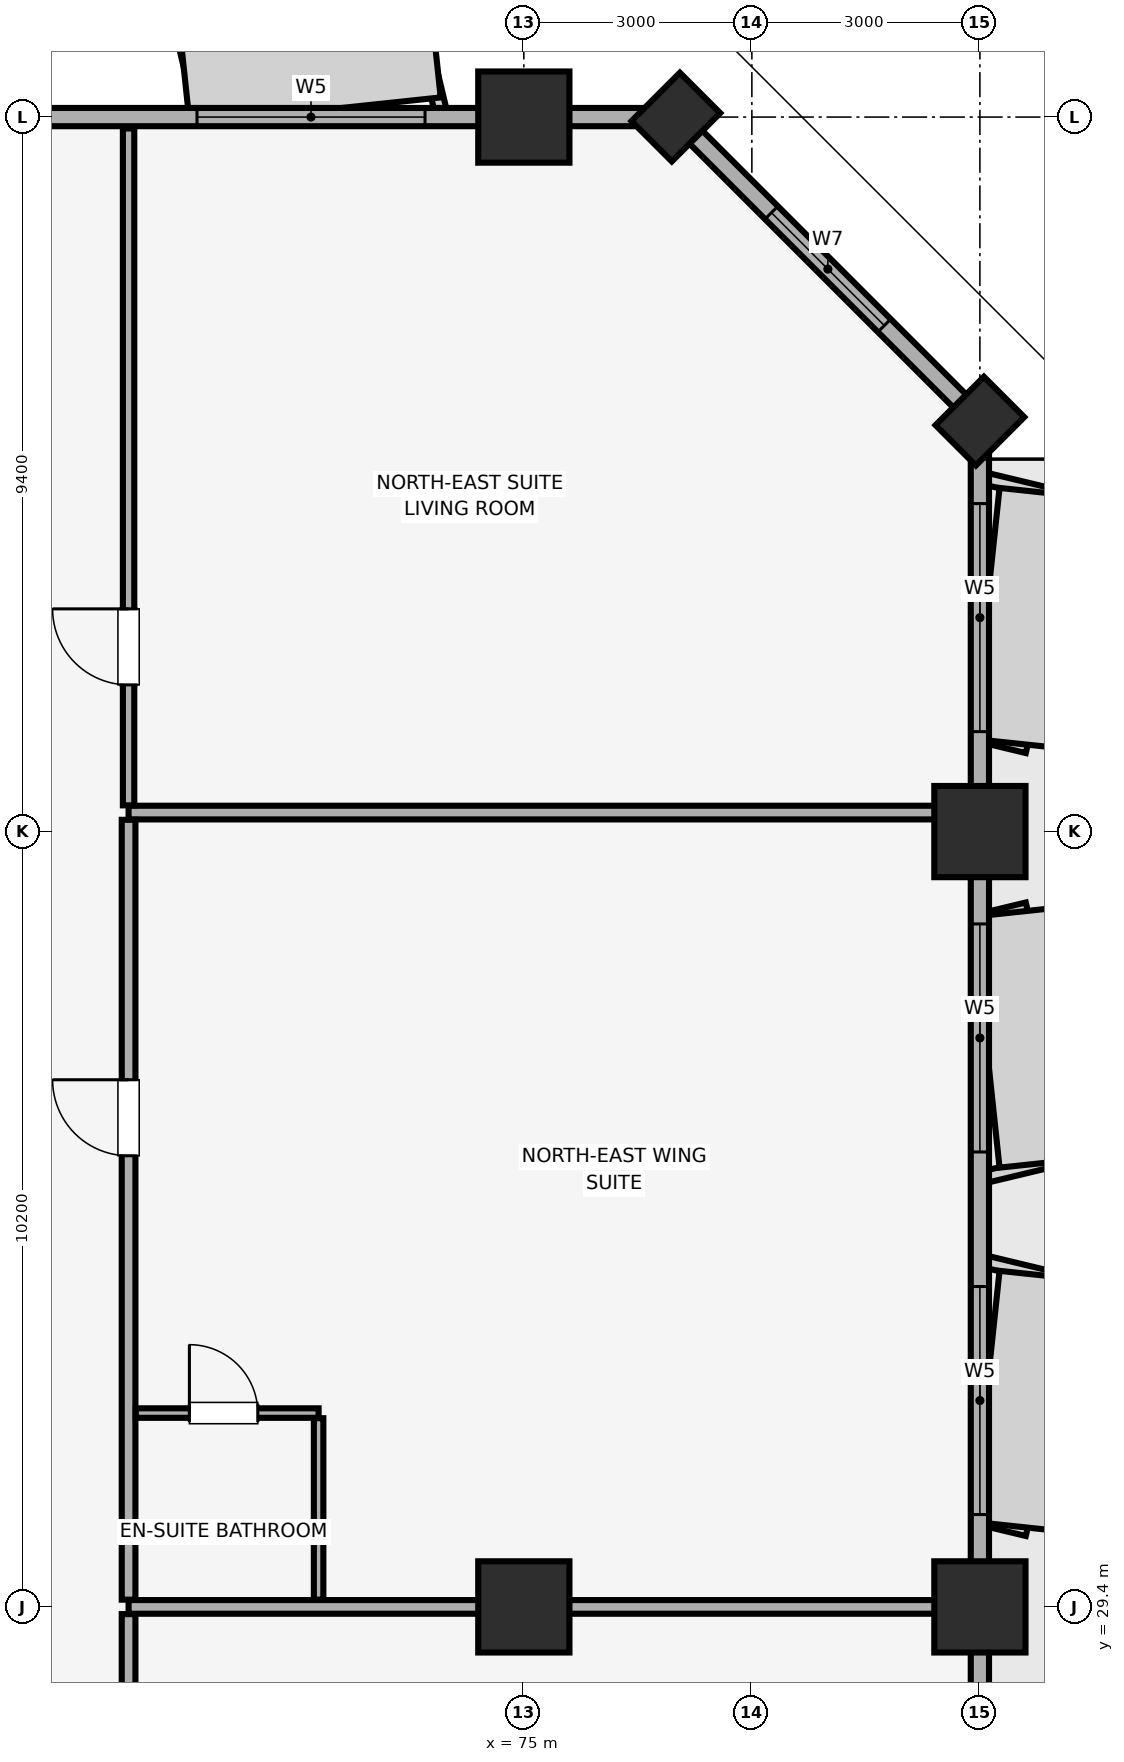
"""IFC4 building model, lengths in metres.
Left out: names, types, materials, properties, quantities, classifications, styles, units other than length and angle.
Written with IfcOpenShell. Run it as: python <this file> out.ifc"""

import sys

from ifc_helpers import new_model, si_unit, direction, frame, frame_2d, origin, origin_2d, place, context, subcontext, project, spatial, rectangle, extrude, element, fill, save


model = new_model("IFC4")
c1 = context("Model", 3, precision=1e-05, world=origin(), true_north=direction((0.0, 1.0)))
c2 = subcontext(c1, "Body", "Model", "MODEL_VIEW")
j1 = project(units=[si_unit("LENGTHUNIT", "METRE"), si_unit("PLANEANGLEUNIT", "RADIAN")], contexts=[c1])
p1 = place(None, origin())
s1 = spatial("IfcSite", under=j1, at=p1, CompositionType="ELEMENT")
p2 = place(p1, origin())
s2 = spatial("IfcBuilding", under=s1, at=p2, CompositionType="ELEMENT")
p3 = place(p2, frame((0.0, 0.0, 135.35)))
s3 = spatial("IfcBuildingStorey", under=s2, at=p3, CompositionType="ELEMENT", Elevation=135.35)
for number, where, z_axis, x_axis in (
    (1, (81.0, 29.4, 0.0), (0.0, 0.0, 1.0), (1.0, 0.0, 0.0)),
    (2, (81.0, 39.6, 0.0), (0.0, 0.0, 1.0), (1.0, 0.0, 0.0)),
):
    element("IfcColumn", number, at=place(p3, frame(where, z_axis=z_axis, x_axis=x_axis)), inside=s3, PredefinedType="COLUMN", context=c2, shape_type="SweptSolid", body=[
        extrude(rectangle(XDim=1.2, YDim=1.2, at=origin_2d()), origin(), (0.0, 0.0, 1.0), 3.56),
    ])
for number, where, z_axis, x_axis in (
    (3, (81.0, 45.0, 0.0), (0.0, 0.0, 1.0), (0.707, 0.707, 0.0)),
    (4, (77.0, 49.0, 0.0), (0.0, 0.0, 1.0), (0.707, 0.707, 0.0)),
):
    element("IfcColumn", number, at=place(p3, frame(where, z_axis=z_axis, x_axis=x_axis)), inside=s3, PredefinedType="PILASTER", context=c2, shape_type="SweptSolid", body=[
        extrude(rectangle(XDim=0.9, YDim=0.75, at=origin_2d()), origin(), (0.0, 0.0, 1.0), 3.56),
    ])
for number, where, z_axis, x_axis in (
    (5, (75.0, 29.4, 0.0), (0.0, 0.0, 1.0), (1.0, 0.0, 0.0)),
    (6, (75.0, 49.0, 0.0), (0.0, 0.0, 1.0), (1.0, 0.0, 0.0)),
):
    element("IfcColumn", number, at=place(p3, frame(where, z_axis=z_axis, x_axis=x_axis)), inside=s3, PredefinedType="COLUMN", context=c2, shape_type="SweptSolid", body=[
        extrude(rectangle(XDim=1.2, YDim=1.2, at=origin_2d()), origin(), (0.0, 0.0, 1.0), 3.56),
    ])
p4 = place(p3, frame((81.0, 7.0, 0.0), z_axis=(0.0, 0.0, 1.0), x_axis=(0.0, 1.0, 0.0)))
e7 = element("IfcWall", 7, at=p4, inside=s3, PredefinedType="SOLIDWALL", context=c2, shape_type="SweptSolid", body=[
    extrude(rectangle(XDim=38.0, YDim=0.24, at=frame_2d((19.0, 0.0))), origin(), (0.0, 0.0, 1.0), 2.61),
])
p5 = place(p4, frame((14.5, 0.0, 0.0)))
e8 = element("IfcOpeningElement", 8, at=p5, cuts=e7, PredefinedType="OPENING", context=c2, shape_type="SweptSolid", body=[
    extrude(rectangle(XDim=1.4, YDim=2.2, at=frame_2d((0.7, 1.1))), frame((0.0, 0.13, 0.0), z_axis=(0.0, -1.0, 0.0), x_axis=(1.0, 0.0, 0.0)), (0.0, 0.0, 1.0), 0.26),
])
p6 = place(p4, frame((1.05, 0.0, 0.85)))
e9 = element("IfcOpeningElement", 9, at=p6, cuts=e7, PredefinedType="OPENING", context=c2, shape_type="SweptSolid", body=[
    extrude(rectangle(XDim=3.0, YDim=1.5, at=frame_2d((1.5, 0.75))), frame((0.0, 0.13, 0.0), z_axis=(0.0, -1.0, 0.0), x_axis=(1.0, 0.0, 0.0)), (0.0, 0.0, 1.0), 0.26),
])
p7 = place(p4, frame((5.4, 0.0, 0.85)))
e10 = element("IfcOpeningElement", 10, at=p7, cuts=e7, PredefinedType="OPENING", context=c2, shape_type="SweptSolid", body=[
    extrude(rectangle(XDim=1.5, YDim=1.4, at=frame_2d((0.75, 0.7))), frame((0.0, 0.13, 0.0), z_axis=(0.0, -1.0, 0.0), x_axis=(1.0, 0.0, 0.0)), (0.0, 0.0, 1.0), 0.26),
])
p8 = place(p4, frame((9.84, 0.0, 0.85)))
e11 = element("IfcOpeningElement", 11, at=p8, cuts=e7, PredefinedType="OPENING", context=c2, shape_type="SweptSolid", body=[
    extrude(rectangle(XDim=3.0, YDim=1.5, at=frame_2d((1.5, 0.75))), frame((0.0, 0.13, 0.0), z_axis=(0.0, -1.0, 0.0), x_axis=(1.0, 0.0, 0.0)), (0.0, 0.0, 1.0), 0.26),
])
p9 = place(p4, frame((17.56, 0.0, 0.85)))
e12 = element("IfcOpeningElement", 12, at=p9, cuts=e7, PredefinedType="OPENING", context=c2, shape_type="SweptSolid", body=[
    extrude(rectangle(XDim=3.0, YDim=1.5, at=frame_2d((1.5, 0.75))), frame((0.0, 0.13, 0.0), z_axis=(0.0, -1.0, 0.0), x_axis=(1.0, 0.0, 0.0)), (0.0, 0.0, 1.0), 0.26),
])
p10 = place(p4, frame((23.615, 0.0, 0.85)))
e13 = element("IfcOpeningElement", 13, at=p10, cuts=e7, PredefinedType="OPENING", context=c2, shape_type="SweptSolid", body=[
    extrude(rectangle(XDim=3.0, YDim=1.5, at=frame_2d((1.5, 0.75))), frame((0.0, 0.13, 0.0), z_axis=(0.0, -1.0, 0.0), x_axis=(1.0, 0.0, 0.0)), (0.0, 0.0, 1.0), 0.26),
])
p11 = place(p4, frame((28.385, 0.0, 0.85)))
e14 = element("IfcOpeningElement", 14, at=p11, cuts=e7, PredefinedType="OPENING", context=c2, shape_type="SweptSolid", body=[
    extrude(rectangle(XDim=3.0, YDim=1.5, at=frame_2d((1.5, 0.75))), frame((0.0, 0.13, 0.0), z_axis=(0.0, -1.0, 0.0), x_axis=(1.0, 0.0, 0.0)), (0.0, 0.0, 1.0), 0.26),
])
p12 = place(p4, frame((33.915, 0.0, 0.85)))
e15 = element("IfcOpeningElement", 15, at=p12, cuts=e7, PredefinedType="OPENING", context=c2, shape_type="SweptSolid", body=[
    extrude(rectangle(XDim=3.0, YDim=1.5, at=frame_2d((1.5, 0.75))), frame((0.0, 0.13, 0.0), z_axis=(0.0, -1.0, 0.0), x_axis=(1.0, 0.0, 0.0)), (0.0, 0.0, 1.0), 0.26),
])
p13 = place(p3, frame((81.0, 45.0, 0.0), z_axis=(0.0, 0.0, 1.0), x_axis=(-0.707106781187, 0.707106781187, 0.0)))
e16 = element("IfcWall", 16, at=p13, inside=s3, PredefinedType="SOLIDWALL", context=c2, shape_type="SweptSolid", body=[
    extrude(rectangle(XDim=5.657, YDim=0.24, at=frame_2d((2.828, 0.0))), origin(), (0.0, 0.0, 1.0), 2.61),
])
p14 = place(p13, frame((1.778, 0.0, 0.85)))
e17 = element("IfcOpeningElement", 17, at=p14, cuts=e16, PredefinedType="OPENING", context=c2, shape_type="SweptSolid", body=[
    extrude(rectangle(XDim=2.1, YDim=1.6, at=frame_2d((1.05, 0.8))), frame((0.0, 0.13, 0.0), z_axis=(0.0, -1.0, 0.0), x_axis=(1.0, 0.0, 0.0)), (0.0, 0.0, 1.0), 0.26),
])
p15 = place(p3, frame((77.0, 49.0, 0.0), z_axis=(0.0, 0.0, 1.0), x_axis=(-1.0, 0.0, 0.0)))
e18 = element("IfcWall", 18, at=p15, inside=s3, PredefinedType="SOLIDWALL", context=c2, shape_type="SweptSolid", body=[
    extrude(rectangle(XDim=70.0, YDim=0.24, at=frame_2d((35.0, 0.0))), origin(), (0.0, 0.0, 1.0), 2.61),
])
p16 = place(p15, frame((63.7, 0.0, 0.85)))
e19 = element("IfcOpeningElement", 19, at=p16, cuts=e18, PredefinedType="OPENING", context=c2, shape_type="SweptSolid", body=[
    extrude(rectangle(XDim=3.0, YDim=1.5, at=frame_2d((1.5, 0.75))), frame((0.0, 0.13, 0.0), z_axis=(0.0, -1.0, 0.0), x_axis=(1.0, 0.0, 0.0)), (0.0, 0.0, 1.0), 0.26),
])
p17 = place(p15, frame((3.3, 0.0, 0.85)))
e20 = element("IfcOpeningElement", 20, at=p17, cuts=e18, PredefinedType="OPENING", context=c2, shape_type="SweptSolid", body=[
    extrude(rectangle(XDim=3.0, YDim=1.5, at=frame_2d((1.5, 0.75))), frame((0.0, 0.13, 0.0), z_axis=(0.0, -1.0, 0.0), x_axis=(1.0, 0.0, 0.0)), (0.0, 0.0, 1.0), 0.26),
])
p18 = place(p15, frame((48.565, 0.0, 0.9)))
e21 = element("IfcOpeningElement", 21, at=p18, cuts=e18, PredefinedType="OPENING", context=c2, shape_type="SweptSolid", body=[
    extrude(rectangle(XDim=1.5, YDim=1.4, at=frame_2d((0.75, 0.7))), frame((0.0, 0.13, 0.0), z_axis=(0.0, -1.0, 0.0), x_axis=(1.0, 0.0, 0.0)), (0.0, 0.0, 1.0), 0.26),
])
p19 = place(p15, frame((41.75, 0.0, 0.9)))
e22 = element("IfcOpeningElement", 22, at=p19, cuts=e18, PredefinedType="OPENING", context=c2, shape_type="SweptSolid", body=[
    extrude(rectangle(XDim=1.5, YDim=1.4, at=frame_2d((0.75, 0.7))), frame((0.0, 0.13, 0.0), z_axis=(0.0, -1.0, 0.0), x_axis=(1.0, 0.0, 0.0)), (0.0, 0.0, 1.0), 0.26),
])
p20 = place(p15, frame((25.3, 0.0, 0.9)))
e23 = element("IfcOpeningElement", 23, at=p20, cuts=e18, PredefinedType="OPENING", context=c2, shape_type="SweptSolid", body=[
    extrude(rectangle(XDim=1.5, YDim=1.4, at=frame_2d((0.75, 0.7))), frame((0.0, 0.13, 0.0), z_axis=(0.0, -1.0, 0.0), x_axis=(1.0, 0.0, 0.0)), (0.0, 0.0, 1.0), 0.26),
])
p21 = place(p15, frame((20.685, 0.0, 0.9)))
e24 = element("IfcOpeningElement", 24, at=p21, cuts=e18, PredefinedType="OPENING", context=c2, shape_type="SweptSolid", body=[
    extrude(rectangle(XDim=1.5, YDim=1.4, at=frame_2d((0.75, 0.7))), frame((0.0, 0.13, 0.0), z_axis=(0.0, -1.0, 0.0), x_axis=(1.0, 0.0, 0.0)), (0.0, 0.0, 1.0), 0.26),
])
p22 = place(p3, frame((69.8, 29.4, 0.0), z_axis=(0.0, 0.0, 1.0), x_axis=(1.0, 0.0, 0.0)))
e25 = element("IfcWall", 25, at=p22, inside=s3, PredefinedType="PARTITIONING", context=c2, shape_type="SweptSolid", body=[
    extrude(rectangle(XDim=11.05, YDim=0.18, at=frame_2d((5.525, 0.0))), origin(), (0.0, 0.0, 1.0), 2.91),
])
p23 = place(p3, frame((69.8, 11.795, 0.0), z_axis=(0.0, 0.0, 1.0), x_axis=(0.0, 1.0, 0.0)))
e26 = element("IfcWall", 26, at=p23, inside=s3, PredefinedType="PARTITIONING", context=c2, shape_type="SweptSolid", body=[
    extrude(rectangle(XDim=17.51, YDim=0.18, at=frame_2d((8.755, 0.0))), origin(), (0.0, 0.0, 1.0), 3.56),
])
p24 = place(p23, frame((9.905, 0.0, 0.0)))
e27 = element("IfcOpeningElement", 27, at=p24, cuts=e26, PredefinedType="OPENING", context=c2, shape_type="SweptSolid", body=[
    extrude(rectangle(XDim=1.0, YDim=2.15, at=frame_2d((0.5, 1.075))), frame((0.0, 0.1, 0.0), z_axis=(0.0, -1.0, 0.0), x_axis=(1.0, 0.0, 0.0)), (0.0, 0.0, 1.0), 0.2),
])
p25 = place(p3, frame((69.8, 39.85, 0.0), z_axis=(0.0, 0.0, 1.0), x_axis=(1.0, 0.0, 0.0)))
e28 = element("IfcWall", 28, at=p25, inside=s3, PredefinedType="PARTITIONING", context=c2, shape_type="SweptSolid", body=[
    extrude(rectangle(XDim=11.05, YDim=0.18, at=frame_2d((5.525, 0.0))), origin(), (0.0, 0.0, 1.0), 3.56),
])
p26 = place(p3, frame((69.8, 29.495, 0.0), z_axis=(0.0, 0.0, 1.0), x_axis=(0.0, 1.0, 0.0)))
e29 = element("IfcWall", 29, at=p26, inside=s3, PredefinedType="PARTITIONING", context=c2, shape_type="SweptSolid", body=[
    extrude(rectangle(XDim=10.26, YDim=0.18, at=frame_2d((5.13, 0.0))), origin(), (0.0, 0.0, 1.0), 3.56),
])
p27 = place(p26, frame((5.84, 0.0, 0.0)))
e30 = element("IfcOpeningElement", 30, at=p27, cuts=e29, PredefinedType="OPENING", context=c2, shape_type="SweptSolid", body=[
    extrude(rectangle(XDim=1.0, YDim=2.15, at=frame_2d((0.5, 1.075))), frame((0.0, 0.1, 0.0), z_axis=(0.0, -1.0, 0.0), x_axis=(1.0, 0.0, 0.0)), (0.0, 0.0, 1.0), 0.2),
])
p28 = place(p3, frame((69.895, 31.95, 0.0), z_axis=(0.0, 0.0, 1.0), x_axis=(1.0, 0.0, 0.0)))
e31 = element("IfcWall", 31, at=p28, inside=s3, PredefinedType="PARTITIONING", context=c2, shape_type="SweptSolid", body=[
    extrude(rectangle(XDim=2.405, YDim=0.125, at=frame_2d((1.203, 0.0))), origin(), (0.0, 0.0, 1.0), 3.56),
])
p29 = place(p28, frame((0.705, 0.0, 0.0)))
e32 = element("IfcOpeningElement", 32, at=p29, cuts=e31, PredefinedType="OPENING", context=c2, shape_type="SweptSolid", body=[
    extrude(rectangle(XDim=0.9, YDim=2.1, at=frame_2d((0.45, 1.05))), frame((0.0, 0.073, 0.0), z_axis=(0.0, -1.0, 0.0), x_axis=(1.0, 0.0, 0.0)), (0.0, 0.0, 1.0), 0.145),
])
p30 = place(p3, frame((72.3, 29.495, 0.0), z_axis=(0.0, 0.0, 1.0), x_axis=(0.0, 1.0, 0.0)))
e33 = element("IfcWall", 33, at=p30, inside=s3, PredefinedType="PARTITIONING", context=c2, shape_type="SweptSolid", body=[
    extrude(rectangle(XDim=2.387, YDim=0.125, at=frame_2d((1.194, 0.0))), origin(), (0.0, 0.0, 1.0), 3.56),
])
p31 = place(p3, frame((69.8, 39.945, 0.0), z_axis=(0.0, 0.0, 1.0), x_axis=(0.0, 1.0, 0.0)))
e34 = element("IfcWall", 34, at=p31, inside=s3, PredefinedType="PARTITIONING", context=c2, shape_type="SweptSolid", body=[
    extrude(rectangle(XDim=8.905, YDim=0.15, at=frame_2d((4.453, 0.0))), origin(), (0.0, 0.0, 1.0), 3.56),
])
p32 = place(p31, frame((1.585, 0.0, 0.0)))
e35 = element("IfcOpeningElement", 35, at=p32, cuts=e34, PredefinedType="OPENING", context=c2, shape_type="SweptSolid", body=[
    extrude(rectangle(XDim=1.0, YDim=2.15, at=frame_2d((0.5, 1.075))), frame((0.0, 0.085, 0.0), z_axis=(0.0, -1.0, 0.0), x_axis=(1.0, 0.0, 0.0)), (0.0, 0.0, 1.0), 0.17),
])
p33 = place(p14, origin())
e36 = element("IfcWindow", 36, at=p33, inside=s3, PartitioningType="SINGLE_PANEL", PredefinedType="WINDOW", context=c2, shape_type="SweptSolid", body=[
    extrude(rectangle(XDim=2.1, YDim=1.6, at=frame_2d((1.05, 0.8))), frame((0.0, 0.03, 0.0), z_axis=(0.0, -1.0, 0.0), x_axis=(1.0, 0.0, 0.0)), (0.0, 0.0, 1.0), 0.06),
])
fill(e17, e36)
p34 = place(p10, origin())
e37 = element("IfcWindow", 37, at=p34, inside=s3, PartitioningType="SINGLE_PANEL", PredefinedType="WINDOW", context=c2, shape_type="SweptSolid", body=[
    extrude(rectangle(XDim=3.0, YDim=1.5, at=frame_2d((1.5, 0.75))), frame((0.0, 0.03, 0.0), z_axis=(0.0, -1.0, 0.0), x_axis=(1.0, 0.0, 0.0)), (0.0, 0.0, 1.0), 0.06),
])
fill(e13, e37)
p35 = place(p11, origin())
e38 = element("IfcWindow", 38, at=p35, inside=s3, PartitioningType="SINGLE_PANEL", PredefinedType="WINDOW", context=c2, shape_type="SweptSolid", body=[
    extrude(rectangle(XDim=3.0, YDim=1.5, at=frame_2d((1.5, 0.75))), frame((0.0, 0.03, 0.0), z_axis=(0.0, -1.0, 0.0), x_axis=(1.0, 0.0, 0.0)), (0.0, 0.0, 1.0), 0.06),
])
fill(e14, e38)
p36 = place(p12, origin())
e39 = element("IfcWindow", 39, at=p36, inside=s3, PartitioningType="SINGLE_PANEL", PredefinedType="WINDOW", context=c2, shape_type="SweptSolid", body=[
    extrude(rectangle(XDim=3.0, YDim=1.5, at=frame_2d((1.5, 0.75))), frame((0.0, 0.03, 0.0), z_axis=(0.0, -1.0, 0.0), x_axis=(1.0, 0.0, 0.0)), (0.0, 0.0, 1.0), 0.06),
])
fill(e15, e39)
p37 = place(p17, origin())
e40 = element("IfcWindow", 40, at=p37, inside=s3, PartitioningType="SINGLE_PANEL", PredefinedType="WINDOW", context=c2, shape_type="SweptSolid", body=[
    extrude(rectangle(XDim=3.0, YDim=1.5, at=frame_2d((1.5, 0.75))), frame((0.0, 0.03, 0.0), z_axis=(0.0, -1.0, 0.0), x_axis=(1.0, 0.0, 0.0)), (0.0, 0.0, 1.0), 0.06),
])
fill(e20, e40)
p38 = place(p27, origin())
e41 = element("IfcDoor", 41, at=p38, inside=s3, OperationType="SINGLE_SWING_RIGHT", PredefinedType="DOOR", context=c2, shape_type="SweptSolid", body=[
    extrude(rectangle(XDim=1.0, YDim=2.15, at=frame_2d((0.5, 1.075))), frame((0.0, 0.025, 0.0), z_axis=(0.0, -1.0, 0.0), x_axis=(1.0, 0.0, 0.0)), (0.0, 0.0, 1.0), 0.05),
])
fill(e30, e41)
p39 = place(p29, origin())
e42 = element("IfcDoor", 42, at=p39, inside=s3, OperationType="SINGLE_SWING_LEFT", PredefinedType="DOOR", context=c2, shape_type="SweptSolid", body=[
    extrude(rectangle(XDim=0.9, YDim=2.1, at=frame_2d((0.45, 1.05))), frame((0.0, 0.025, 0.0), z_axis=(0.0, -1.0, 0.0), x_axis=(1.0, 0.0, 0.0)), (0.0, 0.0, 1.0), 0.05),
])
fill(e32, e42)
p40 = place(p32, origin())
e43 = element("IfcDoor", 43, at=p40, inside=s3, OperationType="SINGLE_SWING_RIGHT", PredefinedType="DOOR", context=c2, shape_type="SweptSolid", body=[
    extrude(rectangle(XDim=1.0, YDim=2.15, at=frame_2d((0.5, 1.075))), frame((0.0, 0.025, 0.0), z_axis=(0.0, -1.0, 0.0), x_axis=(1.0, 0.0, 0.0)), (0.0, 0.0, 1.0), 0.05),
])
fill(e35, e43)
save(model, sys.argv[1])
